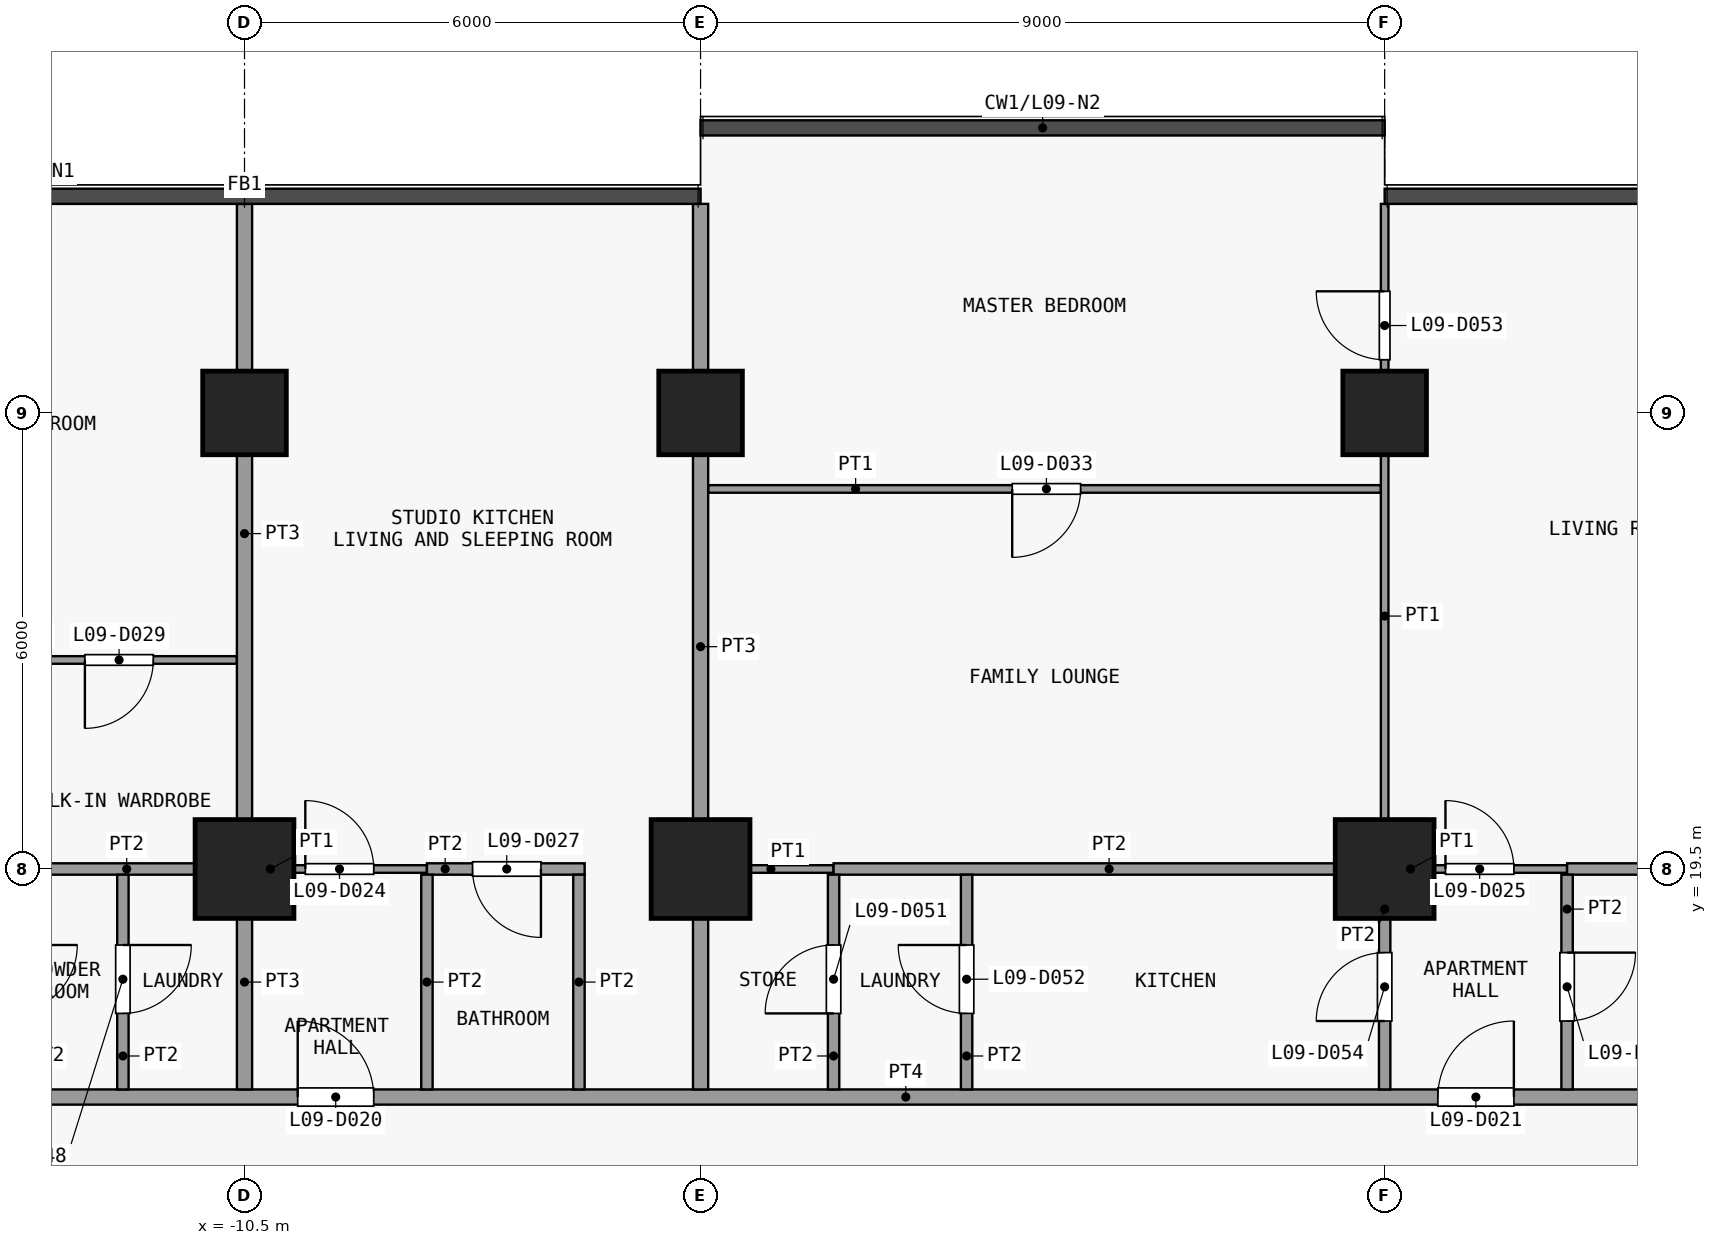
"""IFC4 building model, lengths in metres.
Left out: names, types, materials, properties, quantities, classifications, styles, units other than length and angle.
Written with IfcOpenShell. Run it as: python <this file> out.ifc"""

import sys

from ifc_helpers import new_model, si_unit, direction, frame, frame_2d, origin, origin_2d, place, context, subcontext, project, spatial, rectangle, extrude, element, fill, save


model = new_model("IFC4")
c1 = context("Model", 3, precision=1e-05, world=origin(), true_north=direction((0.0, 1.0)))
c2 = subcontext(c1, "Body", "Model", "MODEL_VIEW")
j1 = project(units=[si_unit("LENGTHUNIT", "METRE"), si_unit("PLANEANGLEUNIT", "RADIAN")], contexts=[c1])
p1 = place(None, origin())
s1 = spatial("IfcSite", under=j1, at=p1, CompositionType="ELEMENT")
p2 = place(p1, origin())
s2 = spatial("IfcBuilding", under=s1, at=p2, CompositionType="ELEMENT")
p3 = place(p2, frame((0.0, 0.0, 43.3)))
s3 = spatial("IfcBuildingStorey", under=s2, at=p3, CompositionType="ELEMENT", Elevation=43.3)
p4 = place(p3, frame((-10.5, 19.5, 0.0), z_axis=(0.0, 0.0, 1.0), x_axis=(1.0, 0.0, 0.0)))
e1 = element("IfcColumn", 1, at=p4, inside=s3, PredefinedType="COLUMN", context=c2, shape_type="SweptSolid", body=[
    extrude(rectangle(XDim=1.3, YDim=1.3, at=origin_2d()), origin(), (0.0, 0.0, 1.0), 3.6),
])
p5 = place(p3, frame((-10.5, 25.5, 0.0), z_axis=(0.0, 0.0, 1.0), x_axis=(1.0, 0.0, 0.0)))
e2 = element("IfcColumn", 2, at=p5, inside=s3, PredefinedType="COLUMN", context=c2, shape_type="SweptSolid", body=[
    extrude(rectangle(XDim=1.1, YDim=1.1, at=origin_2d()), origin(), (0.0, 0.0, 1.0), 3.6),
])
p6 = place(p3, frame((-4.5, 19.5, 0.0), z_axis=(0.0, 0.0, 1.0), x_axis=(1.0, 0.0, 0.0)))
e3 = element("IfcColumn", 3, at=p6, inside=s3, PredefinedType="COLUMN", context=c2, shape_type="SweptSolid", body=[
    extrude(rectangle(XDim=1.3, YDim=1.3, at=origin_2d()), origin(), (0.0, 0.0, 1.0), 3.6),
])
p7 = place(p3, frame((-4.5, 25.5, 0.0), z_axis=(0.0, 0.0, 1.0), x_axis=(1.0, 0.0, 0.0)))
e4 = element("IfcColumn", 4, at=p7, inside=s3, PredefinedType="COLUMN", context=c2, shape_type="SweptSolid", body=[
    extrude(rectangle(XDim=1.1, YDim=1.1, at=origin_2d()), origin(), (0.0, 0.0, 1.0), 3.6),
])
p8 = place(p3, frame((4.5, 19.5, 0.0), z_axis=(0.0, 0.0, 1.0), x_axis=(1.0, 0.0, 0.0)))
e5 = element("IfcColumn", 5, at=p8, inside=s3, PredefinedType="COLUMN", context=c2, shape_type="SweptSolid", body=[
    extrude(rectangle(XDim=1.3, YDim=1.3, at=origin_2d()), origin(), (0.0, 0.0, 1.0), 3.6),
])
p9 = place(p3, frame((4.5, 25.5, 0.0), z_axis=(0.0, 0.0, 1.0), x_axis=(1.0, 0.0, 0.0)))
e6 = element("IfcColumn", 6, at=p9, inside=s3, PredefinedType="COLUMN", context=c2, shape_type="SweptSolid", body=[
    extrude(rectangle(XDim=1.1, YDim=1.1, at=origin_2d()), origin(), (0.0, 0.0, 1.0), 3.6),
])
p10 = place(p3, frame((-25.35, 16.5, 0.0), z_axis=(0.0, 0.0, 1.0), x_axis=(1.0, 0.0, 0.0)))
e7 = element("IfcWall", 7, at=p10, inside=s3, PredefinedType="PARTITIONING", context=c2, shape_type="SweptSolid", body=[
    extrude(rectangle(XDim=50.7, YDim=0.2, at=frame_2d((25.35, 0.0))), origin(), (0.0, 0.0, 1.0), 3.3),
])
p11 = place(p10, frame((7.05, 0.0, 0.0)))
e8 = element("IfcOpeningElement", 8, at=p11, cuts=e7, PredefinedType="OPENING", context=c2, shape_type="SweptSolid", body=[
    extrude(rectangle(XDim=1.0, YDim=2.1, at=frame_2d((0.5, 1.05))), frame((0.0, 0.11, 0.0), z_axis=(0.0, -1.0, 0.0), x_axis=(1.0, 0.0, 0.0)), (0.0, 0.0, 1.0), 0.22),
])
p12 = place(p10, frame((15.55, 0.0, 0.0)))
e9 = element("IfcOpeningElement", 9, at=p12, cuts=e7, PredefinedType="OPENING", context=c2, shape_type="SweptSolid", body=[
    extrude(rectangle(XDim=1.0, YDim=2.1, at=frame_2d((0.5, 1.05))), frame((0.0, 0.11, 0.0), z_axis=(0.0, -1.0, 0.0), x_axis=(1.0, 0.0, 0.0)), (0.0, 0.0, 1.0), 0.22),
])
p13 = place(p10, frame((30.55, 0.0, 0.0)))
e10 = element("IfcOpeningElement", 10, at=p13, cuts=e7, PredefinedType="OPENING", context=c2, shape_type="SweptSolid", body=[
    extrude(rectangle(XDim=1.0, YDim=2.1, at=frame_2d((0.5, 1.05))), frame((0.0, 0.11, 0.0), z_axis=(0.0, -1.0, 0.0), x_axis=(1.0, 0.0, 0.0)), (0.0, 0.0, 1.0), 0.22),
])
p14 = place(p10, frame((45.05, 0.0, 0.0)))
e11 = element("IfcOpeningElement", 11, at=p14, cuts=e7, PredefinedType="OPENING", context=c2, shape_type="SweptSolid", body=[
    extrude(rectangle(XDim=1.0, YDim=2.1, at=frame_2d((0.5, 1.05))), frame((0.0, 0.11, 0.0), z_axis=(0.0, -1.0, 0.0), x_axis=(1.0, 0.0, 0.0)), (0.0, 0.0, 1.0), 0.22),
])
p15 = place(p3, frame((-10.5, 19.5, 0.0), z_axis=(0.0, 0.0, 1.0), x_axis=(1.0, 0.0, 0.0)))
e12 = element("IfcWall", 12, at=p15, inside=s3, PredefinedType="PARTITIONING", context=c2, shape_type="SweptSolid", body=[
    extrude(rectangle(XDim=2.4, YDim=0.1, at=frame_2d((1.2, 0.0))), origin(), (0.0, 0.0, 1.0), 3.3),
])
p16 = place(p15, frame((0.8, 0.0, 0.0)))
e13 = element("IfcOpeningElement", 13, at=p16, cuts=e12, PredefinedType="OPENING", context=c2, shape_type="SweptSolid", body=[
    extrude(rectangle(XDim=0.9, YDim=2.1, at=frame_2d((0.45, 1.05))), frame((0.0, 0.06, 0.0), z_axis=(0.0, -1.0, 0.0), x_axis=(1.0, 0.0, 0.0)), (0.0, 0.0, 1.0), 0.12),
])
p17 = place(p3, frame((-4.4, 19.5, 0.0), z_axis=(0.0, 0.0, 1.0), x_axis=(1.0, 0.0, 0.0)))
e14 = element("IfcWall", 14, at=p17, inside=s3, PredefinedType="PARTITIONING", context=c2, shape_type="SweptSolid", body=[
    extrude(rectangle(XDim=1.65, YDim=0.1, at=frame_2d((0.825, 0.0))), origin(), (0.0, 0.0, 1.0), 3.3),
])
p18 = place(p3, frame((4.5, 19.5, 0.0), z_axis=(0.0, 0.0, 1.0), x_axis=(1.0, 0.0, 0.0)))
e15 = element("IfcWall", 15, at=p18, inside=s3, PredefinedType="PARTITIONING", context=c2, shape_type="SweptSolid", body=[
    extrude(rectangle(XDim=2.4, YDim=0.1, at=frame_2d((1.2, 0.0))), origin(), (0.0, 0.0, 1.0), 3.3),
])
p19 = place(p18, frame((0.8, 0.0, 0.0)))
e16 = element("IfcOpeningElement", 16, at=p19, cuts=e15, PredefinedType="OPENING", context=c2, shape_type="SweptSolid", body=[
    extrude(rectangle(XDim=0.9, YDim=2.1, at=frame_2d((0.45, 1.05))), frame((0.0, 0.06, 0.0), z_axis=(0.0, -1.0, 0.0), x_axis=(1.0, 0.0, 0.0)), (0.0, 0.0, 1.0), 0.12),
])
p20 = place(p3, frame((-13.6, 19.5, 0.0), z_axis=(0.0, 0.0, 1.0), x_axis=(1.0, 0.0, 0.0)))
e17 = element("IfcWall", 17, at=p20, inside=s3, PredefinedType="PARTITIONING", context=c2, shape_type="SweptSolid", body=[
    extrude(rectangle(XDim=3.1, YDim=0.15, at=frame_2d((1.55, 0.0))), origin(), (0.0, 0.0, 1.0), 3.3),
])
p21 = place(p3, frame((-8.1, 19.5, 0.0), z_axis=(0.0, 0.0, 1.0), x_axis=(1.0, 0.0, 0.0)))
e18 = element("IfcWall", 18, at=p21, inside=s3, PredefinedType="PARTITIONING", context=c2, shape_type="SweptSolid", body=[
    extrude(rectangle(XDim=2.075, YDim=0.15, at=frame_2d((1.038, 0.0))), origin(), (0.0, 0.0, 1.0), 3.3),
])
p22 = place(p21, frame((0.6, 0.0, 0.0)))
e19 = element("IfcOpeningElement", 19, at=p22, cuts=e18, PredefinedType="OPENING", context=c2, shape_type="SweptSolid", body=[
    extrude(rectangle(XDim=0.9, YDim=2.1, at=frame_2d((0.45, 1.05))), frame((0.0, 0.085, 0.0), z_axis=(0.0, -1.0, 0.0), x_axis=(1.0, 0.0, 0.0)), (0.0, 0.0, 1.0), 0.17),
])
p23 = place(p3, frame((-2.75, 19.5, 0.0), z_axis=(0.0, 0.0, 1.0), x_axis=(1.0, 0.0, 0.0)))
e20 = element("IfcWall", 20, at=p23, inside=s3, PredefinedType="PARTITIONING", context=c2, shape_type="SweptSolid", body=[
    extrude(rectangle(XDim=7.25, YDim=0.15, at=frame_2d((3.625, 0.0))), origin(), (0.0, 0.0, 1.0), 3.3),
])
p24 = place(p3, frame((6.9, 19.5, 0.0), z_axis=(0.0, 0.0, 1.0), x_axis=(1.0, 0.0, 0.0)))
e21 = element("IfcWall", 21, at=p24, inside=s3, PredefinedType="PARTITIONING", context=c2, shape_type="SweptSolid", body=[
    extrude(rectangle(XDim=6.9, YDim=0.15, at=frame_2d((3.45, 0.0))), origin(), (0.0, 0.0, 1.0), 3.3),
])
p25 = place(p3, frame((-13.8, 22.25, 0.0), z_axis=(0.0, 0.0, 1.0), x_axis=(1.0, 0.0, 0.0)))
e22 = element("IfcWall", 22, at=p25, inside=s3, PredefinedType="PARTITIONING", context=c2, shape_type="SweptSolid", body=[
    extrude(rectangle(XDim=3.2, YDim=0.1, at=frame_2d((1.6, 0.0))), origin(), (0.0, 0.0, 1.0), 3.3),
])
p26 = place(p25, frame((1.2, 0.0, 0.0)))
e23 = element("IfcOpeningElement", 23, at=p26, cuts=e22, PredefinedType="OPENING", context=c2, shape_type="SweptSolid", body=[
    extrude(rectangle(XDim=0.9, YDim=2.1, at=frame_2d((0.45, 1.05))), frame((0.0, 0.06, 0.0), z_axis=(0.0, -1.0, 0.0), x_axis=(1.0, 0.0, 0.0)), (0.0, 0.0, 1.0), 0.12),
])
p27 = place(p3, frame((-4.4, 24.5, 0.0), z_axis=(0.0, 0.0, 1.0), x_axis=(1.0, 0.0, 0.0)))
e24 = element("IfcWall", 24, at=p27, inside=s3, PredefinedType="PARTITIONING", context=c2, shape_type="SweptSolid", body=[
    extrude(rectangle(XDim=8.85, YDim=0.1, at=frame_2d((4.425, 0.0))), origin(), (0.0, 0.0, 1.0), 3.3),
])
p28 = place(p27, frame((4.0, 0.0, 0.0)))
e25 = element("IfcOpeningElement", 25, at=p28, cuts=e24, PredefinedType="OPENING", context=c2, shape_type="SweptSolid", body=[
    extrude(rectangle(XDim=0.9, YDim=2.1, at=frame_2d((0.45, 1.05))), frame((0.0, 0.06, 0.0), z_axis=(0.0, -1.0, 0.0), x_axis=(1.0, 0.0, 0.0)), (0.0, 0.0, 1.0), 0.12),
])
p29 = place(p3, frame((-12.1, 16.6, 0.0), z_axis=(0.0, 0.0, 1.0), x_axis=(0.0, 1.0, 0.0)))
e26 = element("IfcWall", 26, at=p29, inside=s3, PredefinedType="PARTITIONING", context=c2, shape_type="SweptSolid", body=[
    extrude(rectangle(XDim=2.825, YDim=0.15, at=frame_2d((1.413, 0.0))), origin(), (0.0, 0.0, 1.0), 3.3),
])
p30 = place(p29, frame((1.0, 0.0, 0.0)))
e27 = element("IfcOpeningElement", 27, at=p30, cuts=e26, PredefinedType="OPENING", context=c2, shape_type="SweptSolid", body=[
    extrude(rectangle(XDim=0.9, YDim=2.1, at=frame_2d((0.45, 1.05))), frame((0.0, 0.085, 0.0), z_axis=(0.0, -1.0, 0.0), x_axis=(1.0, 0.0, 0.0)), (0.0, 0.0, 1.0), 0.17),
])
p31 = place(p3, frame((-10.5, 16.6, 0.0), z_axis=(0.0, 0.0, 1.0), x_axis=(0.0, 1.0, 0.0)))
e28 = element("IfcWall", 28, at=p31, inside=s3, PredefinedType="PARTITIONING", context=c2, shape_type="SweptSolid", body=[
    extrude(rectangle(XDim=2.825, YDim=0.2, at=frame_2d((1.413, 0.0))), origin(), (0.0, 0.0, 1.0), 3.3),
])
p32 = place(p3, frame((-10.5, 19.575, 0.0), z_axis=(0.0, 0.0, 1.0), x_axis=(0.0, 1.0, 0.0)))
e29 = element("IfcWall", 29, at=p32, inside=s3, PredefinedType="PARTITIONING", context=c2, shape_type="SweptSolid", body=[
    extrude(rectangle(XDim=8.675, YDim=0.2, at=frame_2d((4.337, 0.0))), origin(), (0.0, 0.0, 1.0), 3.3),
])
for number, where, z_axis, x_axis in (
    (30, (-8.1, 16.6, 0.0), (0.0, 0.0, 1.0), (0.0, 1.0, 0.0)),
    (31, (-6.1, 16.6, 0.0), (0.0, 0.0, 1.0), (0.0, 1.0, 0.0)),
):
    element("IfcWall", number, at=place(p3, frame(where, z_axis=z_axis, x_axis=x_axis)), inside=s3, PredefinedType="PARTITIONING", context=c2, shape_type="SweptSolid", body=[
        extrude(rectangle(XDim=2.825, YDim=0.15, at=frame_2d((1.413, 0.0))), origin(), (0.0, 0.0, 1.0), 3.3),
    ])
p33 = place(p3, frame((-4.5, 16.6, 0.0), z_axis=(0.0, 0.0, 1.0), x_axis=(0.0, 1.0, 0.0)))
e32 = element("IfcWall", 32, at=p33, inside=s3, PredefinedType="PARTITIONING", context=c2, shape_type="SweptSolid", body=[
    extrude(rectangle(XDim=11.65, YDim=0.2, at=frame_2d((5.825, 0.0))), origin(), (0.0, 0.0, 1.0), 3.3),
])
p34 = place(p3, frame((-2.75, 16.6, 0.0), z_axis=(0.0, 0.0, 1.0), x_axis=(0.0, 1.0, 0.0)))
e33 = element("IfcWall", 33, at=p34, inside=s3, PredefinedType="PARTITIONING", context=c2, shape_type="SweptSolid", body=[
    extrude(rectangle(XDim=2.825, YDim=0.15, at=frame_2d((1.413, 0.0))), origin(), (0.0, 0.0, 1.0), 3.3),
])
p35 = place(p34, frame((1.0, 0.0, 0.0)))
e34 = element("IfcOpeningElement", 34, at=p35, cuts=e33, PredefinedType="OPENING", context=c2, shape_type="SweptSolid", body=[
    extrude(rectangle(XDim=0.9, YDim=2.1, at=frame_2d((0.45, 1.05))), frame((0.0, 0.085, 0.0), z_axis=(0.0, -1.0, 0.0), x_axis=(1.0, 0.0, 0.0)), (0.0, 0.0, 1.0), 0.17),
])
p36 = place(p3, frame((-1.0, 16.6, 0.0), z_axis=(0.0, 0.0, 1.0), x_axis=(0.0, 1.0, 0.0)))
e35 = element("IfcWall", 35, at=p36, inside=s3, PredefinedType="PARTITIONING", context=c2, shape_type="SweptSolid", body=[
    extrude(rectangle(XDim=2.825, YDim=0.15, at=frame_2d((1.413, 0.0))), origin(), (0.0, 0.0, 1.0), 3.3),
])
p37 = place(p36, frame((1.0, 0.0, 0.0)))
e36 = element("IfcOpeningElement", 36, at=p37, cuts=e35, PredefinedType="OPENING", context=c2, shape_type="SweptSolid", body=[
    extrude(rectangle(XDim=0.9, YDim=2.1, at=frame_2d((0.45, 1.05))), frame((0.0, 0.085, 0.0), z_axis=(0.0, -1.0, 0.0), x_axis=(1.0, 0.0, 0.0)), (0.0, 0.0, 1.0), 0.17),
])
p38 = place(p3, frame((4.5, 19.575, 0.0), z_axis=(0.0, 0.0, 1.0), x_axis=(0.0, 1.0, 0.0)))
e37 = element("IfcWall", 37, at=p38, inside=s3, PredefinedType="PARTITIONING", context=c2, shape_type="SweptSolid", body=[
    extrude(rectangle(XDim=8.675, YDim=0.1, at=frame_2d((4.337, 0.0))), origin(), (0.0, 0.0, 1.0), 3.3),
])
p39 = place(p38, frame((6.625, 0.0, 0.0)))
e38 = element("IfcOpeningElement", 38, at=p39, cuts=e37, PredefinedType="OPENING", context=c2, shape_type="SweptSolid", body=[
    extrude(rectangle(XDim=0.9, YDim=2.1, at=frame_2d((0.45, 1.05))), frame((0.0, 0.06, 0.0), z_axis=(0.0, -1.0, 0.0), x_axis=(1.0, 0.0, 0.0)), (0.0, 0.0, 1.0), 0.12),
])
p40 = place(p3, frame((4.5, 16.6, 0.0), z_axis=(0.0, 0.0, 1.0), x_axis=(0.0, 1.0, 0.0)))
e39 = element("IfcWall", 39, at=p40, inside=s3, PredefinedType="PARTITIONING", context=c2, shape_type="SweptSolid", body=[
    extrude(rectangle(XDim=2.825, YDim=0.15, at=frame_2d((1.413, 0.0))), origin(), (0.0, 0.0, 1.0), 3.3),
])
p41 = place(p40, frame((0.9, 0.0, 0.0)))
e40 = element("IfcOpeningElement", 40, at=p41, cuts=e39, PredefinedType="OPENING", context=c2, shape_type="SweptSolid", body=[
    extrude(rectangle(XDim=0.9, YDim=2.1, at=frame_2d((0.45, 1.05))), frame((0.0, 0.085, 0.0), z_axis=(0.0, -1.0, 0.0), x_axis=(1.0, 0.0, 0.0)), (0.0, 0.0, 1.0), 0.17),
])
p42 = place(p3, frame((6.9, 16.6, 0.0), z_axis=(0.0, 0.0, 1.0), x_axis=(0.0, 1.0, 0.0)))
e41 = element("IfcWall", 41, at=p42, inside=s3, PredefinedType="PARTITIONING", context=c2, shape_type="SweptSolid", body=[
    extrude(rectangle(XDim=2.825, YDim=0.15, at=frame_2d((1.413, 0.0))), origin(), (0.0, 0.0, 1.0), 3.3),
])
p43 = place(p42, frame((0.9, 0.0, 0.0)))
e42 = element("IfcOpeningElement", 42, at=p43, cuts=e41, PredefinedType="OPENING", context=c2, shape_type="SweptSolid", body=[
    extrude(rectangle(XDim=0.9, YDim=2.1, at=frame_2d((0.45, 1.05))), frame((0.0, 0.085, 0.0), z_axis=(0.0, -1.0, 0.0), x_axis=(1.0, 0.0, 0.0)), (0.0, 0.0, 1.0), 0.17),
])
p44 = place(p12, origin())
e43 = element("IfcDoor", 43, at=p44, inside=s3, OperationType="SINGLE_SWING_RIGHT", PredefinedType="DOOR", context=c2, shape_type="SweptSolid", body=[
    extrude(rectangle(XDim=1.0, YDim=2.1, at=frame_2d((0.5, 1.05))), frame((0.0, 0.025, 0.0), z_axis=(0.0, -1.0, 0.0), x_axis=(1.0, 0.0, 0.0)), (0.0, 0.0, 1.0), 0.05),
])
fill(e9, e43)
p45 = place(p13, origin())
e44 = element("IfcDoor", 44, at=p45, inside=s3, OperationType="SINGLE_SWING_LEFT", PredefinedType="DOOR", context=c2, shape_type="SweptSolid", body=[
    extrude(rectangle(XDim=1.0, YDim=2.1, at=frame_2d((0.5, 1.05))), frame((0.0, 0.025, 0.0), z_axis=(0.0, -1.0, 0.0), x_axis=(1.0, 0.0, 0.0)), (0.0, 0.0, 1.0), 0.05),
])
fill(e10, e44)
p46 = place(p16, origin())
e45 = element("IfcDoor", 45, at=p46, inside=s3, OperationType="SINGLE_SWING_RIGHT", PredefinedType="DOOR", context=c2, shape_type="SweptSolid", body=[
    extrude(rectangle(XDim=0.9, YDim=2.1, at=frame_2d((0.45, 1.05))), frame((0.0, 0.025, 0.0), z_axis=(0.0, -1.0, 0.0), x_axis=(1.0, 0.0, 0.0)), (0.0, 0.0, 1.0), 0.05),
])
fill(e13, e45)
p47 = place(p19, origin())
e46 = element("IfcDoor", 46, at=p47, inside=s3, OperationType="SINGLE_SWING_RIGHT", PredefinedType="DOOR", context=c2, shape_type="SweptSolid", body=[
    extrude(rectangle(XDim=0.9, YDim=2.1, at=frame_2d((0.45, 1.05))), frame((0.0, 0.025, 0.0), z_axis=(0.0, -1.0, 0.0), x_axis=(1.0, 0.0, 0.0)), (0.0, 0.0, 1.0), 0.05),
])
fill(e16, e46)
p48 = place(p22, origin())
e47 = element("IfcDoor", 47, at=p48, inside=s3, OperationType="SINGLE_SWING_RIGHT", PredefinedType="DOOR", context=c2, shape_type="SweptSolid", body=[
    extrude(rectangle(XDim=0.9, YDim=2.1, at=frame_2d((0.45, 1.05))), frame((0.0, 0.025, 0.0), z_axis=(0.0, -1.0, 0.0), x_axis=(1.0, 0.0, 0.0)), (0.0, 0.0, 1.0), 0.05),
])
fill(e19, e47)
p49 = place(p26, origin())
e48 = element("IfcDoor", 48, at=p49, inside=s3, OperationType="SINGLE_SWING_LEFT", PredefinedType="DOOR", context=c2, shape_type="SweptSolid", body=[
    extrude(rectangle(XDim=0.9, YDim=2.1, at=frame_2d((0.45, 1.05))), frame((0.0, 0.025, 0.0), z_axis=(0.0, -1.0, 0.0), x_axis=(1.0, 0.0, 0.0)), (0.0, 0.0, 1.0), 0.05),
])
fill(e23, e48)
p50 = place(p28, origin())
e49 = element("IfcDoor", 49, at=p50, inside=s3, OperationType="SINGLE_SWING_LEFT", PredefinedType="DOOR", context=c2, shape_type="SweptSolid", body=[
    extrude(rectangle(XDim=0.9, YDim=2.1, at=frame_2d((0.45, 1.05))), frame((0.0, 0.025, 0.0), z_axis=(0.0, -1.0, 0.0), x_axis=(1.0, 0.0, 0.0)), (0.0, 0.0, 1.0), 0.05),
])
fill(e25, e49)
p51 = place(p30, origin())
e50 = element("IfcDoor", 50, at=p51, inside=s3, OperationType="SINGLE_SWING_RIGHT", PredefinedType="DOOR", context=c2, shape_type="SweptSolid", body=[
    extrude(rectangle(XDim=0.9, YDim=2.1, at=frame_2d((0.45, 1.05))), frame((0.0, 0.025, 0.0), z_axis=(0.0, -1.0, 0.0), x_axis=(1.0, 0.0, 0.0)), (0.0, 0.0, 1.0), 0.05),
])
fill(e27, e50)
p52 = place(p35, origin())
e51 = element("IfcDoor", 51, at=p52, inside=s3, OperationType="SINGLE_SWING_RIGHT", PredefinedType="DOOR", context=c2, shape_type="SweptSolid", body=[
    extrude(rectangle(XDim=0.9, YDim=2.1, at=frame_2d((0.45, 1.05))), frame((0.0, 0.025, 0.0), z_axis=(0.0, -1.0, 0.0), x_axis=(1.0, 0.0, 0.0)), (0.0, 0.0, 1.0), 0.05),
])
fill(e34, e51)
p53 = place(p37, origin())
e52 = element("IfcDoor", 52, at=p53, inside=s3, OperationType="SINGLE_SWING_LEFT", PredefinedType="DOOR", context=c2, shape_type="SweptSolid", body=[
    extrude(rectangle(XDim=0.9, YDim=2.1, at=frame_2d((0.45, 1.05))), frame((0.0, 0.025, 0.0), z_axis=(0.0, -1.0, 0.0), x_axis=(1.0, 0.0, 0.0)), (0.0, 0.0, 1.0), 0.05),
])
fill(e36, e52)
p54 = place(p39, origin())
e53 = element("IfcDoor", 53, at=p54, inside=s3, OperationType="SINGLE_SWING_LEFT", PredefinedType="DOOR", context=c2, shape_type="SweptSolid", body=[
    extrude(rectangle(XDim=0.9, YDim=2.1, at=frame_2d((0.45, 1.05))), frame((0.0, 0.025, 0.0), z_axis=(0.0, -1.0, 0.0), x_axis=(1.0, 0.0, 0.0)), (0.0, 0.0, 1.0), 0.05),
])
fill(e38, e53)
p55 = place(p41, origin())
e54 = element("IfcDoor", 54, at=p55, inside=s3, OperationType="SINGLE_SWING_RIGHT", PredefinedType="DOOR", context=c2, shape_type="SweptSolid", body=[
    extrude(rectangle(XDim=0.9, YDim=2.1, at=frame_2d((0.45, 1.05))), frame((0.0, 0.025, 0.0), z_axis=(0.0, -1.0, 0.0), x_axis=(1.0, 0.0, 0.0)), (0.0, 0.0, 1.0), 0.05),
])
fill(e40, e54)
p56 = place(p43, origin())
e55 = element("IfcDoor", 55, at=p56, inside=s3, OperationType="SINGLE_SWING_RIGHT", PredefinedType="DOOR", context=c2, shape_type="SweptSolid", body=[
    extrude(rectangle(XDim=0.9, YDim=2.1, at=frame_2d((0.45, 1.05))), frame((0.0, 0.025, 0.0), z_axis=(0.0, -1.0, 0.0), x_axis=(1.0, 0.0, 0.0)), (0.0, 0.0, 1.0), 0.05),
])
fill(e42, e55)
save(model, sys.argv[1])
